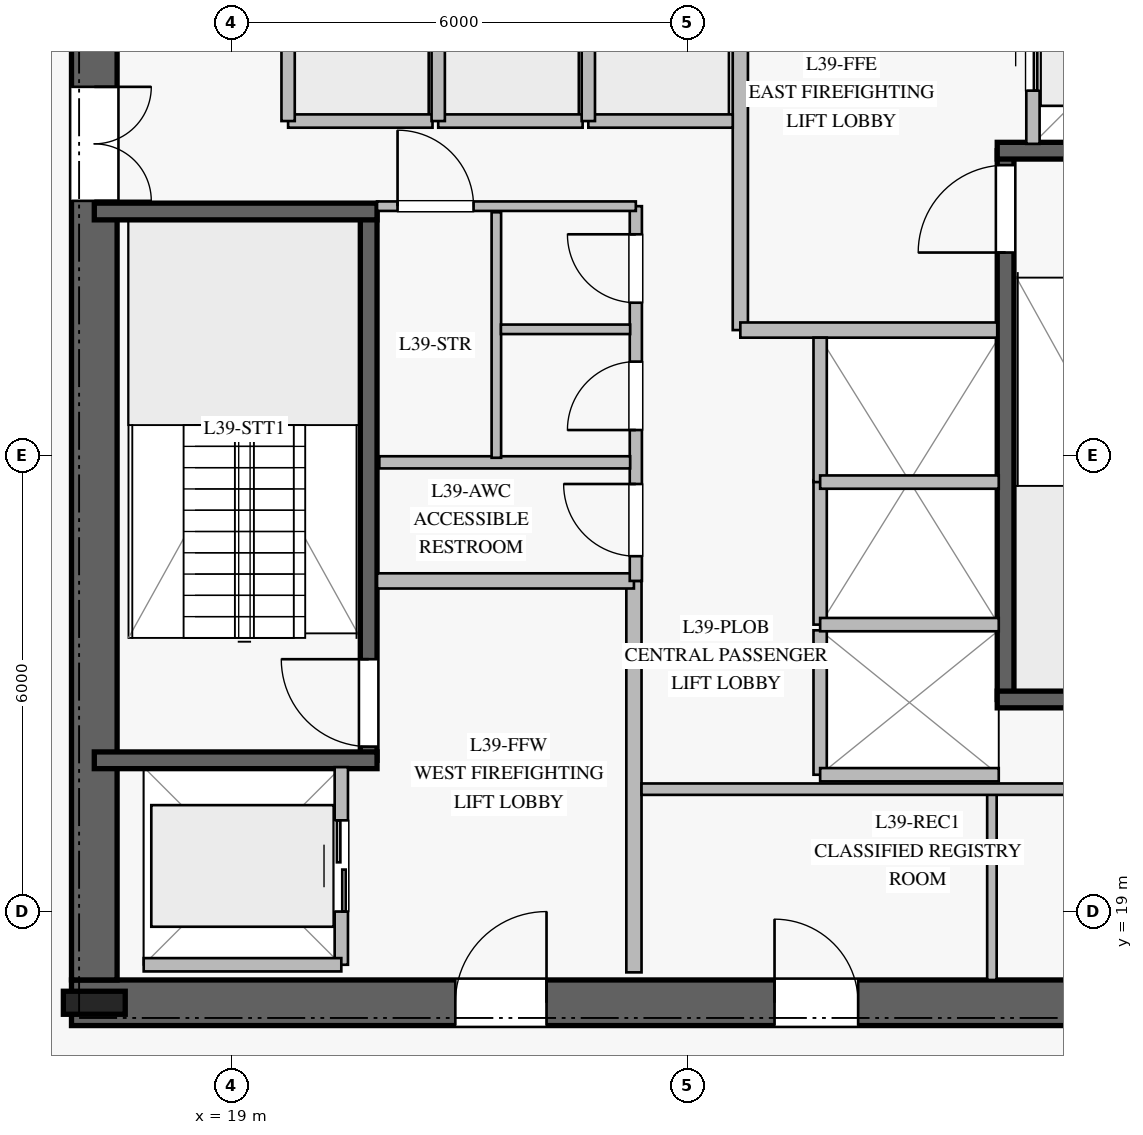
"""IFC4 building model, lengths in metres.
Left out: names, types, materials, properties, quantities, classifications, styles, units other than length and angle.
Written with IfcOpenShell. Run it as: python <this file> out.ifc"""

import sys

from ifc_helpers import new_model, si_unit, direction, frame, frame_2d, origin, origin_2d, place, context, subcontext, project, spatial, rectangle, i_section, extrude, element, fill, save


model = new_model("IFC4")
c1 = context("Model", 3, precision=1e-05, world=origin(), true_north=direction((0.0, 1.0)))
c2 = subcontext(c1, "Body", "Model", "MODEL_VIEW")
j1 = project(units=[si_unit("LENGTHUNIT", "METRE"), si_unit("PLANEANGLEUNIT", "RADIAN")], contexts=[c1])
p1 = place(None, origin())
s1 = spatial("IfcSite", under=j1, at=p1, CompositionType="ELEMENT")
p2 = place(p1, origin())
s2 = spatial("IfcBuilding", under=s1, at=p2, CompositionType="ELEMENT")
p3 = place(p2, frame((0.0, 0.0, 162.4)))
s3 = spatial("IfcBuildingStorey", under=s2, at=p3, CompositionType="ELEMENT", Elevation=162.4)
p4 = place(p3, frame((16.9, 17.8, 0.0), z_axis=(0.0, 0.0, 1.0), x_axis=(1.0, 0.0, 0.0)))
e1 = element("IfcWall", 1, at=p4, inside=s3, PredefinedType="SHEAR", context=c2, shape_type="SweptSolid", body=[
    extrude(rectangle(XDim=16.2, YDim=0.6, at=frame_2d((8.1, 0.0))), origin(), (0.0, 0.0, 1.0), 3.76),
])
p5 = place(p4, frame((5.05, 0.0, 0.0)))
e2 = element("IfcOpeningElement", 2, at=p5, cuts=e1, PredefinedType="OPENING", context=c2, shape_type="SweptSolid", body=[
    extrude(rectangle(XDim=1.2, YDim=2.25, at=frame_2d((0.6, 1.125))), frame((0.0, 0.31, 0.0), z_axis=(0.0, -1.0, 0.0), x_axis=(1.0, 0.0, 0.0)), (0.0, 0.0, 1.0), 0.62),
])
p6 = place(p4, frame((14.0, 0.0, 0.0)))
e3 = element("IfcOpeningElement", 3, at=p6, cuts=e1, PredefinedType="OPENING", context=c2, shape_type="SweptSolid", body=[
    extrude(rectangle(XDim=0.9, YDim=2.1, at=frame_2d((0.45, 1.05))), frame((0.0, 0.31, 0.0), z_axis=(0.0, -1.0, 0.0), x_axis=(1.0, 0.0, 0.0)), (0.0, 0.0, 1.0), 0.62),
])
p7 = place(p4, frame((9.25, 0.0, 0.0)))
e4 = element("IfcOpeningElement", 4, at=p7, cuts=e1, PredefinedType="OPENING", context=c2, shape_type="SweptSolid", body=[
    extrude(rectangle(XDim=1.1, YDim=2.2, at=frame_2d((0.55, 1.1))), frame((0.0, 0.31, 0.0), z_axis=(0.0, -1.0, 0.0), x_axis=(1.0, 0.0, 0.0)), (0.0, 0.0, 1.0), 0.62),
])
p8 = place(p3, frame((17.2, 31.9, 0.0), z_axis=(0.0, 0.0, 1.0), x_axis=(0.0, -1.0, 0.0)))
e5 = element("IfcWall", 5, at=p8, inside=s3, PredefinedType="SHEAR", context=c2, shape_type="SweptSolid", body=[
    extrude(rectangle(XDim=13.8, YDim=0.6, at=frame_2d((6.9, 0.0))), origin(), (0.0, 0.0, 1.0), 3.76),
])
p9 = place(p8, frame((2.05, 0.0, 0.0)))
e6 = element("IfcOpeningElement", 6, at=p9, cuts=e5, PredefinedType="OPENING", context=c2, shape_type="SweptSolid", body=[
    extrude(rectangle(XDim=1.5, YDim=2.2, at=frame_2d((0.75, 1.1))), frame((0.0, 0.31, 0.0), z_axis=(0.0, -1.0, 0.0), x_axis=(1.0, 0.0, 0.0)), (0.0, 0.0, 1.0), 0.62),
])
p10 = place(p3, frame((17.2, 17.8, 0.0), z_axis=(0.0, 0.0, 1.0), x_axis=(1.0, 0.0, 0.0)))
e7 = element("IfcColumn", 7, at=p10, inside=s3, PredefinedType="COLUMN", context=c2, shape_type="SweptSolid", body=[
    extrude(i_section(OverallWidth=0.303, OverallDepth=0.814, WebThickness=0.021, FlangeThickness=0.04, at=origin_2d()), origin(), (0.0, 0.0, 1.0), 4.0),
])
p11 = place(p3, frame((20.81, 20.99, 0.0), z_axis=(0.0, 0.0, 1.0), x_axis=(0.0, 1.0, 0.0)))
e8 = element("IfcWall", 8, at=p11, inside=s3, PredefinedType="SOLIDWALL", context=c2, shape_type="SweptSolid", body=[
    extrude(rectangle(XDim=7.22, YDim=0.22, at=frame_2d((3.61, 0.0))), origin(), (0.0, 0.0, 1.0), 3.76),
])
p12 = place(p11, frame((0.18, 0.0, 0.0)))
e9 = element("IfcOpeningElement", 9, at=p12, cuts=e8, PredefinedType="OPENING", context=c2, shape_type="SweptSolid", body=[
    extrude(rectangle(XDim=1.15, YDim=2.2, at=frame_2d((0.575, 1.1))), frame((0.0, 0.12, 0.0), z_axis=(0.0, -1.0, 0.0), x_axis=(1.0, 0.0, 0.0)), (0.0, 0.0, 1.0), 0.24),
])
for number, where, z_axis, x_axis in (
    (10, (17.2, 20.99, 0.0), (0.0, 0.0, 1.0), (1.0, 0.0, 0.0)),
    (11, (17.2, 28.21, 0.0), (0.0, 0.0, 1.0), (1.0, 0.0, 0.0)),
):
    element("IfcWall", number, at=place(p3, frame(where, z_axis=z_axis, x_axis=x_axis)), inside=s3, PredefinedType="SOLIDWALL", context=c2, shape_type="SweptSolid", body=[
        extrude(rectangle(XDim=3.72, YDim=0.22, at=frame_2d((1.86, 0.0))), origin(), (0.0, 0.0, 1.0), 3.76),
    ])
p13 = place(p3, frame((29.19, 21.79, 0.0), z_axis=(0.0, 0.0, 1.0), x_axis=(0.0, 1.0, 0.0)))
e12 = element("IfcWall", 12, at=p13, inside=s3, PredefinedType="SOLIDWALL", context=c2, shape_type="SweptSolid", body=[
    extrude(rectangle(XDim=7.22, YDim=0.22, at=frame_2d((3.61, 0.0))), origin(), (0.0, 0.0, 1.0), 3.76),
])
p14 = place(p13, frame((5.88, 0.0, 0.0)))
e13 = element("IfcOpeningElement", 13, at=p14, cuts=e12, PredefinedType="OPENING", context=c2, shape_type="SweptSolid", body=[
    extrude(rectangle(XDim=1.15, YDim=2.2, at=frame_2d((0.575, 1.1))), frame((0.0, 0.12, 0.0), z_axis=(0.0, -1.0, 0.0), x_axis=(1.0, 0.0, 0.0)), (0.0, 0.0, 1.0), 0.24),
])
for number, where, z_axis, x_axis in (
    (14, (29.08, 21.79, 0.0), (0.0, 0.0, 1.0), (1.0, 0.0, 0.0)),
    (15, (29.08, 29.01, 0.0), (0.0, 0.0, 1.0), (1.0, 0.0, 0.0)),
):
    element("IfcWall", number, at=place(p3, frame(where, z_axis=z_axis, x_axis=x_axis)), inside=s3, PredefinedType="SOLIDWALL", context=c2, shape_type="SweptSolid", body=[
        extrude(rectangle(XDim=3.72, YDim=0.22, at=frame_2d((1.86, 0.0))), origin(), (0.0, 0.0, 1.0), 3.76),
    ])
p15 = place(p3, frame((24.3, 18.2, 0.0), z_axis=(0.0, 0.0, 1.0), x_axis=(0.0, 1.0, 0.0)))
e16 = element("IfcWall", 16, at=p15, inside=s3, PredefinedType="PARTITIONING", context=c2, shape_type="SweptSolid", body=[
    extrude(rectangle(XDim=5.15, YDim=0.2, at=frame_2d((2.575, 0.0))), origin(), (0.0, 0.0, 1.0), 3.76),
])
p16 = place(p3, frame((20.92, 23.35, 0.0), z_axis=(0.0, 0.0, 1.0), x_axis=(1.0, 0.0, 0.0)))
e17 = element("IfcWall", 17, at=p16, inside=s3, PredefinedType="PARTITIONING", context=c2, shape_type="SweptSolid", body=[
    extrude(rectangle(XDim=3.38, YDim=0.2, at=frame_2d((1.69, 0.0))), origin(), (0.0, 0.0, 1.0), 3.76),
])
p17 = place(p3, frame((25.7, 26.65, 0.0), z_axis=(0.0, 0.0, 1.0), x_axis=(0.0, 1.0, 0.0)))
e18 = element("IfcWall", 18, at=p17, inside=s3, PredefinedType="PARTITIONING", context=c2, shape_type="SweptSolid", body=[
    extrude(rectangle(XDim=5.15, YDim=0.2, at=frame_2d((2.575, 0.0))), origin(), (0.0, 0.0, 1.0), 3.76),
])
p18 = place(p3, frame((25.7, 26.65, 0.0), z_axis=(0.0, 0.0, 1.0), x_axis=(1.0, 0.0, 0.0)))
e19 = element("IfcWall", 19, at=p18, inside=s3, PredefinedType="PARTITIONING", context=c2, shape_type="SweptSolid", body=[
    extrude(rectangle(XDim=3.38, YDim=0.2, at=frame_2d((1.69, 0.0))), origin(), (0.0, 0.0, 1.0), 3.76),
])
p19 = place(p3, frame((24.325, 23.35, 0.0), z_axis=(0.0, 0.0, 1.0), x_axis=(0.0, 1.0, 0.0)))
e20 = element("IfcWall", 20, at=p19, inside=s3, PredefinedType="PLUMBINGWALL", context=c2, shape_type="SweptSolid", body=[
    extrude(rectangle(XDim=4.93, YDim=0.16, at=frame_2d((2.465, 0.0))), origin(), (0.0, 0.0, 1.0), 3.76),
])
p20 = place(p19, frame((0.325, 0.0, 0.0)))
e21 = element("IfcOpeningElement", 21, at=p20, cuts=e20, PredefinedType="OPENING", context=c2, shape_type="SweptSolid", body=[
    extrude(rectangle(XDim=0.95, YDim=2.1, at=frame_2d((0.475, 1.05))), frame((0.0, 0.09, 0.0), z_axis=(0.0, -1.0, 0.0), x_axis=(1.0, 0.0, 0.0)), (0.0, 0.0, 1.0), 0.18),
])
p21 = place(p19, frame((1.985, 0.0, 0.0)))
e22 = element("IfcOpeningElement", 22, at=p21, cuts=e20, PredefinedType="OPENING", context=c2, shape_type="SweptSolid", body=[
    extrude(rectangle(XDim=0.9, YDim=2.1, at=frame_2d((0.45, 1.05))), frame((0.0, 0.09, 0.0), z_axis=(0.0, -1.0, 0.0), x_axis=(1.0, 0.0, 0.0)), (0.0, 0.0, 1.0), 0.18),
])
p22 = place(p19, frame((3.66, 0.0, 0.0)))
e23 = element("IfcOpeningElement", 23, at=p22, cuts=e20, PredefinedType="OPENING", context=c2, shape_type="SweptSolid", body=[
    extrude(rectangle(XDim=0.9, YDim=2.1, at=frame_2d((0.45, 1.05))), frame((0.0, 0.09, 0.0), z_axis=(0.0, -1.0, 0.0), x_axis=(1.0, 0.0, 0.0)), (0.0, 0.0, 1.0), 0.18),
])
p23 = place(p3, frame((20.92, 28.28, 0.0), z_axis=(0.0, 0.0, 1.0), x_axis=(1.0, 0.0, 0.0)))
e24 = element("IfcWall", 24, at=p23, inside=s3, PredefinedType="PARTITIONING", context=c2, shape_type="SweptSolid", body=[
    extrude(rectangle(XDim=3.405, YDim=0.125, at=frame_2d((1.703, 0.0))), origin(), (0.0, 0.0, 1.0), 3.76),
])
p24 = place(p23, frame((0.27, 0.0, 0.0)))
e25 = element("IfcOpeningElement", 25, at=p24, cuts=e24, PredefinedType="OPENING", context=c2, shape_type="SweptSolid", body=[
    extrude(rectangle(XDim=1.0, YDim=2.15, at=frame_2d((0.5, 1.075))), frame((0.0, 0.073, 0.0), z_axis=(0.0, -1.0, 0.0), x_axis=(1.0, 0.0, 0.0)), (0.0, 0.0, 1.0), 0.145),
])
p25 = place(p3, frame((29.01, 18.1, 0.0), z_axis=(0.0, 0.0, 1.0), x_axis=(0.0, 1.0, 0.0)))
e26 = element("IfcWall", 26, at=p25, inside=s3, PredefinedType="PARTITIONING", context=c2, shape_type="SweptSolid", body=[
    extrude(rectangle(XDim=2.45, YDim=0.125, at=frame_2d((1.225, 0.0))), origin(), (0.0, 0.0, 1.0), 3.76),
])
p26 = place(p3, frame((20.95, 24.91, 0.0), z_axis=(0.0, 0.0, 1.0), x_axis=(1.0, 0.0, 0.0)))
e27 = element("IfcWall", 27, at=p26, inside=s3, PredefinedType="PLUMBINGWALL", context=c2, shape_type="SweptSolid", body=[
    extrude(rectangle(XDim=3.3, YDim=0.16, at=frame_2d((1.65, 0.0))), origin(), (0.0, 0.0, 1.0), 3.76),
])
p27 = place(p3, frame((22.49, 24.97, 0.0), z_axis=(0.0, 0.0, 1.0), x_axis=(0.0, 1.0, 0.0)))
e28 = element("IfcWall", 28, at=p27, inside=s3, PredefinedType="PARTITIONING", context=c2, shape_type="SweptSolid", body=[
    extrude(rectangle(XDim=3.23, YDim=0.125, at=frame_2d((1.615, 0.0))), origin(), (0.0, 0.0, 1.0), 3.76),
])
p28 = place(p3, frame((22.55, 26.66, 0.0), z_axis=(0.0, 0.0, 1.0), x_axis=(1.0, 0.0, 0.0)))
e29 = element("IfcWall", 29, at=p28, inside=s3, PredefinedType="PARTITIONING", context=c2, shape_type="SweptSolid", body=[
    extrude(rectangle(XDim=1.7, YDim=0.125, at=frame_2d((0.85, 0.0))), origin(), (0.0, 0.0, 1.0), 3.76),
])
p29 = place(p3, frame((24.4, 20.61, 0.0), z_axis=(0.0, 0.0, 1.0), x_axis=(1.0, 0.0, 0.0)))
e30 = element("IfcWall", 30, at=p29, inside=s3, PredefinedType="PARTITIONING", context=c2, shape_type="SweptSolid", body=[
    extrude(rectangle(XDim=5.9, YDim=0.15, at=frame_2d((2.95, 0.0))), origin(), (0.0, 0.0, 1.0), 3.76),
])
p30 = place(p3, frame((19.75, 29.4, 0.0), z_axis=(0.0, 0.0, 1.0), x_axis=(1.0, 0.0, 0.0)))
e31 = element("IfcWall", 31, at=p30, inside=s3, PredefinedType="PARTITIONING", context=c2, shape_type="SweptSolid", body=[
    extrude(rectangle(XDim=1.9, YDim=0.175, at=frame_2d((0.95, 0.0))), origin(), (0.0, 0.0, 1.0), 3.76),
])
p31 = place(p3, frame((19.75, 29.4, 0.0), z_axis=(0.0, 0.0, 1.0), x_axis=(0.0, 1.0, 0.0)))
e32 = element("IfcWall", 32, at=p31, inside=s3, PredefinedType="PARTITIONING", context=c2, shape_type="SweptSolid", body=[
    extrude(rectangle(XDim=2.35, YDim=0.175, at=frame_2d((1.175, 0.0))), origin(), (0.0, 0.0, 1.0), 3.76),
])
p32 = place(p3, frame((21.725, 29.4, 0.0), z_axis=(0.0, 0.0, 1.0), x_axis=(1.0, 0.0, 0.0)))
e33 = element("IfcWall", 33, at=p32, inside=s3, PredefinedType="PARTITIONING", context=c2, shape_type="SweptSolid", body=[
    extrude(rectangle(XDim=1.9, YDim=0.175, at=frame_2d((0.95, 0.0))), origin(), (0.0, 0.0, 1.0), 3.76),
])
p33 = place(p3, frame((21.725, 29.4, 0.0), z_axis=(0.0, 0.0, 1.0), x_axis=(0.0, 1.0, 0.0)))
e34 = element("IfcWall", 34, at=p33, inside=s3, PredefinedType="PARTITIONING", context=c2, shape_type="SweptSolid", body=[
    extrude(rectangle(XDim=2.35, YDim=0.175, at=frame_2d((1.175, 0.0))), origin(), (0.0, 0.0, 1.0), 3.76),
])
p34 = place(p3, frame((23.7, 29.4, 0.0), z_axis=(0.0, 0.0, 1.0), x_axis=(1.0, 0.0, 0.0)))
e35 = element("IfcWall", 35, at=p34, inside=s3, PredefinedType="PARTITIONING", context=c2, shape_type="SweptSolid", body=[
    extrude(rectangle(XDim=1.9, YDim=0.175, at=frame_2d((0.95, 0.0))), origin(), (0.0, 0.0, 1.0), 3.76),
])
p35 = place(p3, frame((23.7, 29.4, 0.0), z_axis=(0.0, 0.0, 1.0), x_axis=(0.0, 1.0, 0.0)))
e36 = element("IfcWall", 36, at=p35, inside=s3, PredefinedType="PARTITIONING", context=c2, shape_type="SweptSolid", body=[
    extrude(rectangle(XDim=2.35, YDim=0.175, at=frame_2d((1.175, 0.0))), origin(), (0.0, 0.0, 1.0), 3.76),
])
p36 = place(p3, frame((26.75, 20.8, 0.0), z_axis=(0.0, 0.0, 1.0), x_axis=(0.0, 1.0, 0.0)))
e37 = element("IfcWall", 37, at=p36, inside=s3, PredefinedType="PARTITIONING", context=c2, shape_type="SweptSolid", body=[
    extrude(rectangle(XDim=1.9, YDim=0.175, at=frame_2d((0.95, 0.0))), origin(), (0.0, 0.0, 1.0), 3.76),
])
p37 = place(p3, frame((26.75, 20.8, 0.0), z_axis=(0.0, 0.0, 1.0), x_axis=(1.0, 0.0, 0.0)))
e38 = element("IfcWall", 38, at=p37, inside=s3, PredefinedType="PARTITIONING", context=c2, shape_type="SweptSolid", body=[
    extrude(rectangle(XDim=2.35, YDim=0.175, at=frame_2d((1.175, 0.0))), origin(), (0.0, 0.0, 1.0), 3.76),
])
p38 = place(p3, frame((26.75, 22.775, 0.0), z_axis=(0.0, 0.0, 1.0), x_axis=(0.0, 1.0, 0.0)))
e39 = element("IfcWall", 39, at=p38, inside=s3, PredefinedType="PARTITIONING", context=c2, shape_type="SweptSolid", body=[
    extrude(rectangle(XDim=1.9, YDim=0.175, at=frame_2d((0.95, 0.0))), origin(), (0.0, 0.0, 1.0), 3.76),
])
p39 = place(p3, frame((26.75, 22.775, 0.0), z_axis=(0.0, 0.0, 1.0), x_axis=(1.0, 0.0, 0.0)))
e40 = element("IfcWall", 40, at=p39, inside=s3, PredefinedType="PARTITIONING", context=c2, shape_type="SweptSolid", body=[
    extrude(rectangle(XDim=2.35, YDim=0.175, at=frame_2d((1.175, 0.0))), origin(), (0.0, 0.0, 1.0), 3.76),
])
p40 = place(p3, frame((26.75, 24.65, 0.0), z_axis=(0.0, 0.0, 1.0), x_axis=(0.0, 1.0, 0.0)))
e41 = element("IfcWall", 41, at=p40, inside=s3, PredefinedType="PARTITIONING", context=c2, shape_type="SweptSolid", body=[
    extrude(rectangle(XDim=1.9, YDim=0.175, at=frame_2d((0.95, 0.0))), origin(), (0.0, 0.0, 1.0), 3.76),
])
p41 = place(p3, frame((26.75, 24.65, 0.0), z_axis=(0.0, 0.0, 1.0), x_axis=(1.0, 0.0, 0.0)))
e42 = element("IfcWall", 42, at=p41, inside=s3, PredefinedType="PARTITIONING", context=c2, shape_type="SweptSolid", body=[
    extrude(rectangle(XDim=2.35, YDim=0.175, at=frame_2d((1.175, 0.0))), origin(), (0.0, 0.0, 1.0), 3.76),
])
p42 = place(p3, frame((20.45, 18.3, 0.0), z_axis=(0.0, 0.0, 1.0), x_axis=(0.0, 1.0, 0.0)))
e43 = element("IfcWall", 43, at=p42, inside=s3, PredefinedType="PARTITIONING", context=c2, shape_type="SweptSolid", body=[
    extrude(rectangle(XDim=2.6, YDim=0.175, at=frame_2d((1.3, 0.0))), origin(), (0.0, 0.0, 1.0), 3.76),
])
p43 = place(p42, frame((0.7, 0.0, 0.0)))
e44 = element("IfcOpeningElement", 44, at=p43, cuts=e43, PredefinedType="OPENING", context=c2, shape_type="SweptSolid", body=[
    extrude(rectangle(XDim=1.2, YDim=2.2, at=frame_2d((0.6, 1.1))), frame((0.0, 0.098, 0.0), z_axis=(0.0, -1.0, 0.0), x_axis=(1.0, 0.0, 0.0)), (0.0, 0.0, 1.0), 0.195),
])
p44 = place(p3, frame((17.85, 18.3, 0.0), z_axis=(0.0, 0.0, 1.0), x_axis=(1.0, 0.0, 0.0)))
e45 = element("IfcWall", 45, at=p44, inside=s3, PredefinedType="PARTITIONING", context=c2, shape_type="SweptSolid", body=[
    extrude(rectangle(XDim=2.6, YDim=0.175, at=frame_2d((1.3, 0.0))), origin(), (0.0, 0.0, 1.0), 3.76),
])
p45 = place(p3, frame((29.55, 29.1, 0.0), z_axis=(0.0, 0.0, 1.0), x_axis=(0.0, 1.0, 0.0)))
e46 = element("IfcWall", 46, at=p45, inside=s3, PredefinedType="PARTITIONING", context=c2, shape_type="SweptSolid", body=[
    extrude(rectangle(XDim=2.6, YDim=0.175, at=frame_2d((1.3, 0.0))), origin(), (0.0, 0.0, 1.0), 3.76),
])
p46 = place(p45, frame((0.7, 0.0, 0.0)))
e47 = element("IfcOpeningElement", 47, at=p46, cuts=e46, PredefinedType="OPENING", context=c2, shape_type="SweptSolid", body=[
    extrude(rectangle(XDim=1.2, YDim=2.2, at=frame_2d((0.6, 1.1))), frame((0.0, 0.098, 0.0), z_axis=(0.0, -1.0, 0.0), x_axis=(1.0, 0.0, 0.0)), (0.0, 0.0, 1.0), 0.195),
])
p47 = place(p12, origin())
e48 = element("IfcDoor", 48, at=p47, inside=s3, OperationType="SINGLE_SWING_RIGHT", PredefinedType="DOOR", context=c2, shape_type="SweptSolid", body=[
    extrude(rectangle(XDim=1.15, YDim=2.2, at=frame_2d((0.575, 1.1))), frame((0.0, 0.025, 0.0), z_axis=(0.0, -1.0, 0.0), x_axis=(1.0, 0.0, 0.0)), (0.0, 0.0, 1.0), 0.05),
])
fill(e9, e48)
p48 = place(p14, origin())
e49 = element("IfcDoor", 49, at=p48, inside=s3, OperationType="SINGLE_SWING_LEFT", PredefinedType="DOOR", context=c2, shape_type="SweptSolid", body=[
    extrude(rectangle(XDim=1.15, YDim=2.2, at=frame_2d((0.575, 1.1))), frame((0.0, 0.025, 0.0), z_axis=(0.0, -1.0, 0.0), x_axis=(1.0, 0.0, 0.0)), (0.0, 0.0, 1.0), 0.05),
])
fill(e13, e49)
p49 = place(p5, origin())
e50 = element("IfcDoor", 50, at=p49, inside=s3, OperationType="SINGLE_SWING_RIGHT", PredefinedType="DOOR", context=c2, shape_type="SweptSolid", body=[
    extrude(rectangle(XDim=1.2, YDim=2.25, at=frame_2d((0.6, 1.125))), frame((0.0, 0.025, 0.0), z_axis=(0.0, -1.0, 0.0), x_axis=(1.0, 0.0, 0.0)), (0.0, 0.0, 1.0), 0.05),
])
fill(e2, e50)
p50 = place(p9, origin())
e51 = element("IfcDoor", 51, at=p50, inside=s3, OperationType="DOUBLE_DOOR_SINGLE_SWING", PredefinedType="DOOR", context=c2, shape_type="SweptSolid", body=[
    extrude(rectangle(XDim=1.5, YDim=2.2, at=frame_2d((0.75, 1.1))), frame((0.0, 0.025, 0.0), z_axis=(0.0, -1.0, 0.0), x_axis=(1.0, 0.0, 0.0)), (0.0, 0.0, 1.0), 0.05),
])
fill(e6, e51)
p51 = place(p20, origin())
e52 = element("IfcDoor", 52, at=p51, inside=s3, OperationType="SINGLE_SWING_RIGHT", PredefinedType="DOOR", context=c2, shape_type="SweptSolid", body=[
    extrude(rectangle(XDim=0.95, YDim=2.1, at=frame_2d((0.475, 1.05))), frame((0.0, 0.025, 0.0), z_axis=(0.0, -1.0, 0.0), x_axis=(1.0, 0.0, 0.0)), (0.0, 0.0, 1.0), 0.05),
])
fill(e21, e52)
p52 = place(p21, origin())
e53 = element("IfcDoor", 53, at=p52, inside=s3, OperationType="SINGLE_SWING_LEFT", PredefinedType="DOOR", context=c2, shape_type="SweptSolid", body=[
    extrude(rectangle(XDim=0.9, YDim=2.1, at=frame_2d((0.45, 1.05))), frame((0.0, 0.025, 0.0), z_axis=(0.0, -1.0, 0.0), x_axis=(1.0, 0.0, 0.0)), (0.0, 0.0, 1.0), 0.05),
])
fill(e22, e53)
p53 = place(p22, origin())
e54 = element("IfcDoor", 54, at=p53, inside=s3, OperationType="SINGLE_SWING_RIGHT", PredefinedType="DOOR", context=c2, shape_type="SweptSolid", body=[
    extrude(rectangle(XDim=0.9, YDim=2.1, at=frame_2d((0.45, 1.05))), frame((0.0, 0.025, 0.0), z_axis=(0.0, -1.0, 0.0), x_axis=(1.0, 0.0, 0.0)), (0.0, 0.0, 1.0), 0.05),
])
fill(e23, e54)
p54 = place(p24, origin())
e55 = element("IfcDoor", 55, at=p54, inside=s3, OperationType="SINGLE_SWING_LEFT", PredefinedType="DOOR", context=c2, shape_type="SweptSolid", body=[
    extrude(rectangle(XDim=1.0, YDim=2.15, at=frame_2d((0.5, 1.075))), frame((0.0, 0.025, 0.0), z_axis=(0.0, -1.0, 0.0), x_axis=(1.0, 0.0, 0.0)), (0.0, 0.0, 1.0), 0.05),
])
fill(e25, e55)
p55 = place(p7, origin())
e56 = element("IfcDoor", 56, at=p55, inside=s3, OperationType="SINGLE_SWING_LEFT", PredefinedType="DOOR", context=c2, shape_type="SweptSolid", body=[
    extrude(rectangle(XDim=1.1, YDim=2.2, at=frame_2d((0.55, 1.1))), frame((0.0, 0.025, 0.0), z_axis=(0.0, -1.0, 0.0), x_axis=(1.0, 0.0, 0.0)), (0.0, 0.0, 1.0), 0.05),
])
fill(e4, e56)
p56 = place(p43, origin())
e57 = element("IfcDoor", 57, at=p56, inside=s3, OperationType="DOUBLE_DOOR_SLIDING", PredefinedType="DOOR", context=c2, shape_type="SweptSolid", body=[
    extrude(rectangle(XDim=1.2, YDim=2.2, at=frame_2d((0.6, 1.1))), frame((0.0, 0.025, 0.0), z_axis=(0.0, -1.0, 0.0), x_axis=(1.0, 0.0, 0.0)), (0.0, 0.0, 1.0), 0.05),
])
fill(e44, e57)
p57 = place(p46, origin())
e58 = element("IfcDoor", 58, at=p57, inside=s3, OperationType="DOUBLE_DOOR_SLIDING", PredefinedType="DOOR", context=c2, shape_type="SweptSolid", body=[
    extrude(rectangle(XDim=1.2, YDim=2.2, at=frame_2d((0.6, 1.1))), frame((0.0, 0.025, 0.0), z_axis=(0.0, -1.0, 0.0), x_axis=(1.0, 0.0, 0.0)), (0.0, 0.0, 1.0), 0.05),
])
fill(e47, e58)
save(model, sys.argv[1])
